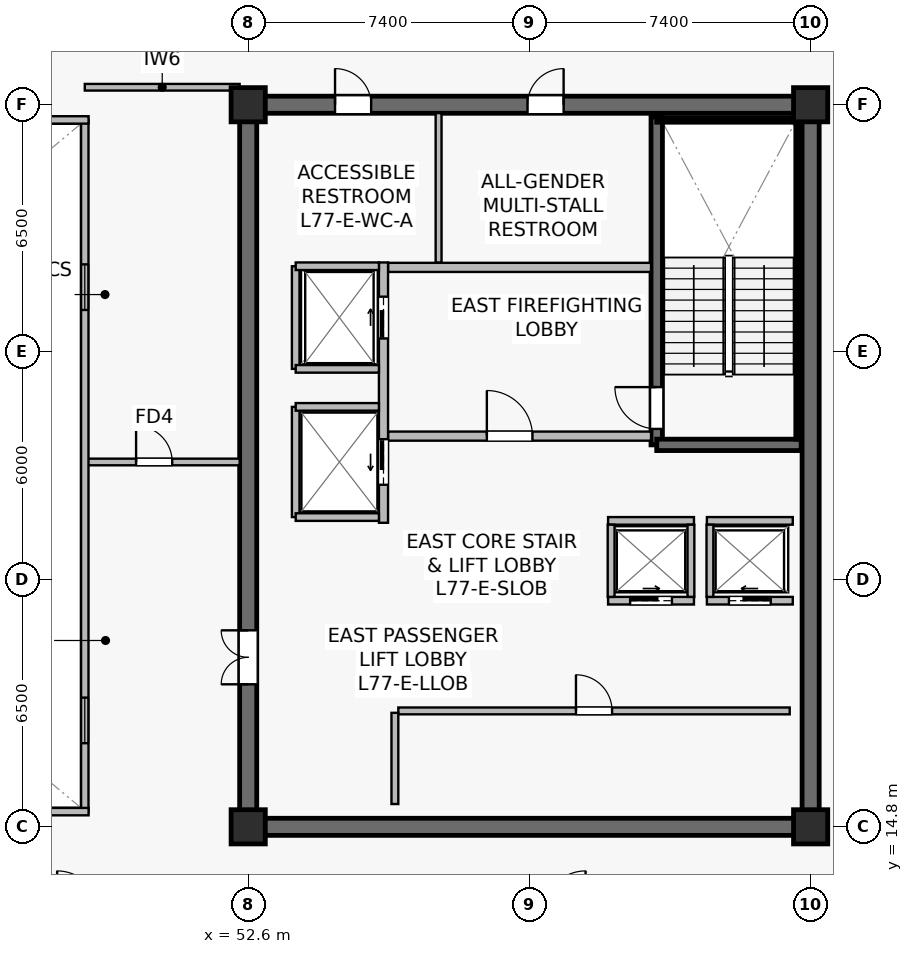
"""IFC4 building model, lengths in metres.
Left out: names, types, materials, properties, quantities, classifications, styles, units other than length and angle.
Written with IfcOpenShell. Run it as: python <this file> out.ifc"""

import sys

from ifc_helpers import new_model, si_unit, direction, frame, frame_2d, origin, origin_2d, place, context, subcontext, project, spatial, rectangle, extrude, source, transform, mapped, element, fill, save


model = new_model("IFC4")
c1 = context("Model", 3, precision=1e-05, world=origin(), true_north=direction((0.0, 1.0)))
c2 = subcontext(c1, "Body", "Model", "MODEL_VIEW")
j1 = project(units=[si_unit("LENGTHUNIT", "METRE"), si_unit("PLANEANGLEUNIT", "RADIAN")], contexts=[c1])
p1 = place(None, origin())
s1 = spatial("IfcSite", under=j1, at=p1, CompositionType="ELEMENT")
p2 = place(p1, origin())
s2 = spatial("IfcBuilding", under=s1, at=p2, CompositionType="ELEMENT")
p3 = place(p2, frame((0.0, 0.0, 322.8)))
s3 = spatial("IfcBuildingStorey", under=s2, at=p3, CompositionType="ELEMENT", Elevation=322.8)
p4 = place(p3, frame((52.375, 14.8, 0.0), z_axis=(0.0, 0.0, 1.0), x_axis=(1.0, 0.0, 0.0)))
e1 = element("IfcWall", 1, at=p4, inside=s3, PredefinedType="SHEAR", context=c2, shape_type="SweptSolid", body=[
    extrude(rectangle(XDim=15.25, YDim=0.45, at=frame_2d((7.625, 0.0))), origin(), (0.0, 0.0, 1.0), 3.92),
])
p5 = place(p3, frame((52.375, 33.8, 0.0), z_axis=(0.0, 0.0, 1.0), x_axis=(1.0, 0.0, 0.0)))
e2 = element("IfcWall", 2, at=p5, inside=s3, PredefinedType="SHEAR", context=c2, shape_type="SweptSolid", body=[
    extrude(rectangle(XDim=15.25, YDim=0.45, at=frame_2d((7.625, 0.0))), origin(), (0.0, 0.0, 1.0), 3.92),
])
p6 = place(p5, frame((7.575, 0.0, 0.0)))
e3 = element("IfcOpeningElement", 3, at=p6, cuts=e2, PredefinedType="OPENING", context=c2, shape_type="SweptSolid", body=[
    extrude(rectangle(XDim=0.95, YDim=2.15, at=frame_2d((0.475, 1.075))), frame((0.0, 0.235, 0.0), z_axis=(0.0, -1.0, 0.0), x_axis=(1.0, 0.0, 0.0)), (0.0, 0.0, 1.0), 0.47),
])
p7 = place(p5, frame((2.51, 0.0, 0.0)))
e4 = element("IfcOpeningElement", 4, at=p7, cuts=e2, PredefinedType="OPENING", context=c2, shape_type="SweptSolid", body=[
    extrude(rectangle(XDim=0.95, YDim=2.15, at=frame_2d((0.475, 1.075))), frame((0.0, 0.235, 0.0), z_axis=(0.0, -1.0, 0.0), x_axis=(1.0, 0.0, 0.0)), (0.0, 0.0, 1.0), 0.47),
])
p8 = place(p3, frame((52.6, 15.025, 0.0), z_axis=(0.0, 0.0, 1.0), x_axis=(0.0, 1.0, 0.0)))
e5 = element("IfcWall", 5, at=p8, inside=s3, PredefinedType="SHEAR", context=c2, shape_type="SweptSolid", body=[
    extrude(rectangle(XDim=18.55, YDim=0.45, at=frame_2d((9.275, 0.0))), origin(), (0.0, 0.0, 1.0), 3.92),
])
p9 = place(p8, frame((3.525, 0.0, 0.0)))
e6 = element("IfcOpeningElement", 6, at=p9, cuts=e5, PredefinedType="OPENING", context=c2, shape_type="SweptSolid", body=[
    extrude(rectangle(XDim=1.42, YDim=2.2, at=frame_2d((0.71, 1.1))), frame((0.0, 0.235, 0.0), z_axis=(0.0, -1.0, 0.0), x_axis=(1.0, 0.0, 0.0)), (0.0, 0.0, 1.0), 0.47),
])
p10 = place(p3, frame((67.4, 15.025, 0.0), z_axis=(0.0, 0.0, 1.0), x_axis=(0.0, 1.0, 0.0)))
e7 = element("IfcWall", 7, at=p10, inside=s3, PredefinedType="SHEAR", context=c2, shape_type="SweptSolid", body=[
    extrude(rectangle(XDim=18.55, YDim=0.45, at=frame_2d((9.275, 0.0))), origin(), (0.0, 0.0, 1.0), 3.92),
])
p11 = place(p3, frame((63.35, 24.85, 0.0), z_axis=(0.0, 0.0, 1.0), x_axis=(0.0, 1.0, 0.0)))
e8 = element("IfcWall", 8, at=p11, inside=s3, PredefinedType="SHEAR", context=c2, shape_type="SweptSolid", body=[
    extrude(rectangle(XDim=8.63, YDim=0.3, at=frame_2d((4.315, 0.0))), origin(), (0.0, 0.0, 1.0), 3.92),
])
p12 = place(p11, frame((0.42, 0.0, 0.0)))
e9 = element("IfcOpeningElement", 9, at=p12, cuts=e8, PredefinedType="OPENING", context=c2, shape_type="SweptSolid", body=[
    extrude(rectangle(XDim=1.1, YDim=2.15, at=frame_2d((0.55, 1.075))), frame((0.0, 0.16, 0.0), z_axis=(0.0, -1.0, 0.0), x_axis=(1.0, 0.0, 0.0)), (0.0, 0.0, 1.0), 0.32),
])
p13 = place(p3, frame((63.35, 24.85, 0.0), z_axis=(0.0, 0.0, 1.0), x_axis=(1.0, 0.0, 0.0)))
e10 = element("IfcWall", 10, at=p13, inside=s3, PredefinedType="SHEAR", context=c2, shape_type="SweptSolid", body=[
    extrude(rectangle(XDim=3.8, YDim=0.3, at=frame_2d((1.9, 0.0))), origin(), (0.0, 0.0, 1.0), 3.92),
])
p14 = place(p3, frame((63.35, 33.4, 0.0), z_axis=(0.0, 0.0, 1.0), x_axis=(1.0, 0.0, 0.0)))
e11 = element("IfcWall", 11, at=p14, inside=s3, PredefinedType="SOLIDWALL", context=c2, shape_type="SweptSolid", body=[
    extrude(rectangle(XDim=3.72, YDim=0.12, at=frame_2d((1.86, 0.0))), origin(), (0.0, 0.0, 1.0), 3.92),
])
p15 = place(p3, frame((67.07, 25.0, 0.0), z_axis=(0.0, 0.0, 1.0), x_axis=(0.0, 1.0, 0.0)))
e12 = element("IfcWall", 12, at=p15, inside=s3, PredefinedType="SOLIDWALL", context=c2, shape_type="SweptSolid", body=[
    extrude(rectangle(XDim=8.32, YDim=0.12, at=frame_2d((4.16, 0.0))), origin(), (0.0, 0.0, 1.0), 3.92),
])
m1 = source(origin(), c2, "Body", "SweptSolid", [
    extrude(rectangle(XDim=0.9, YDim=0.9, at=origin_2d()), origin(), (0.0, 0.0, 1.0), 4.2),
])
for number, where, z_axis, x_axis in (
    (13, (52.6, 14.8, 0.0), (0.0, 0.0, 1.0), (1.0, 0.0, 0.0)),
    (14, (67.4, 14.8, 0.0), (0.0, 0.0, 1.0), (1.0, 0.0, 0.0)),
    (15, (52.6, 33.8, 0.0), (0.0, 0.0, 1.0), (1.0, 0.0, 0.0)),
    (16, (67.4, 33.8, 0.0), (0.0, 0.0, 1.0), (1.0, 0.0, 0.0)),
):
    element("IfcColumn", number, at=place(p3, frame(where, z_axis=z_axis, x_axis=x_axis)), inside=s3, PredefinedType="COLUMN", context=c2, shape_type="MappedRepresentation", body=[
        mapped(m1, transform((0.0, 0.0, 0.0), scale=1.0)),
    ])
p16 = place(p3, frame((56.28, 25.08, 0.0), z_axis=(0.0, 0.0, 1.0), x_axis=(1.0, 0.0, 0.0)))
e17 = element("IfcWall", 17, at=p16, inside=s3, PredefinedType="SOLIDWALL", context=c2, shape_type="SweptSolid", body=[
    extrude(rectangle(XDim=6.92, YDim=0.24, at=frame_2d((3.46, 0.0))), origin(), (0.0, 0.0, 1.0), 3.317),
])
p17 = place(p16, frame((2.6, 0.0, 0.0)))
e18 = element("IfcOpeningElement", 18, at=p17, cuts=e17, PredefinedType="OPENING", context=c2, shape_type="SweptSolid", body=[
    extrude(rectangle(XDim=1.2, YDim=2.16, at=frame_2d((0.6, 1.08))), frame((0.0, 0.13, 0.0), z_axis=(0.0, -1.0, 0.0), x_axis=(1.0, 0.0, 0.0)), (0.0, 0.0, 1.0), 0.26),
])
p18 = place(p3, frame((56.28, 29.52, 0.0), z_axis=(0.0, 0.0, 1.0), x_axis=(1.0, 0.0, 0.0)))
e19 = element("IfcWall", 19, at=p18, inside=s3, PredefinedType="SOLIDWALL", context=c2, shape_type="SweptSolid", body=[
    extrude(rectangle(XDim=6.92, YDim=0.24, at=frame_2d((3.46, 0.0))), origin(), (0.0, 0.0, 1.0), 3.317),
])
p19 = place(p3, frame((56.16, 22.8, 0.0), z_axis=(0.0, 0.0, 1.0), x_axis=(0.0, 1.0, 0.0)))
e20 = element("IfcWall", 20, at=p19, inside=s3, PredefinedType="SOLIDWALL", context=c2, shape_type="SweptSolid", body=[
    extrude(rectangle(XDim=6.85, YDim=0.24, at=frame_2d((3.425, 0.0))), origin(), (0.0, 0.0, 1.0), 3.055),
])
p20 = place(p19, frame((4.85, 0.0, 0.0)))
e21 = element("IfcOpeningElement", 21, at=p20, cuts=e20, PredefinedType="OPENING", context=c2, shape_type="SweptSolid", body=[
    extrude(rectangle(XDim=1.1, YDim=2.22, at=frame_2d((0.55, 1.11))), frame((0.0, 0.13, 0.0), z_axis=(0.0, -1.0, 0.0), x_axis=(1.0, 0.0, 0.0)), (0.0, 0.0, 1.0), 0.26),
])
p21 = place(p19, frame((1.0, 0.0, 0.0)))
e22 = element("IfcOpeningElement", 22, at=p21, cuts=e20, PredefinedType="OPENING", context=c2, shape_type="SweptSolid", body=[
    extrude(rectangle(XDim=1.2, YDim=2.22, at=frame_2d((0.6, 1.11))), frame((0.0, 0.13, 0.0), z_axis=(0.0, -1.0, 0.0), x_axis=(1.0, 0.0, 0.0)), (0.0, 0.0, 1.0), 0.26),
])
p22 = place(p3, frame((64.67, 20.75, 0.0), z_axis=(0.0, 0.0, 1.0), x_axis=(1.0, 0.0, 0.0)))
e23 = element("IfcWall", 23, at=p22, inside=s3, PredefinedType="SOLIDWALL", context=c2, shape_type="SweptSolid", body=[
    extrude(rectangle(XDim=2.26, YDim=0.2, at=frame_2d((1.13, 0.0))), origin(), (0.0, 0.0, 1.0), 3.92),
])
p23 = place(p22, frame((0.58, 0.0, 0.0)))
e24 = element("IfcOpeningElement", 24, at=p23, cuts=e23, PredefinedType="OPENING", context=c2, shape_type="SweptSolid", body=[
    extrude(rectangle(XDim=1.1, YDim=2.22, at=frame_2d((0.55, 1.11))), frame((0.0, 0.11, 0.0), z_axis=(0.0, -1.0, 0.0), x_axis=(1.0, 0.0, 0.0)), (0.0, 0.0, 1.0), 0.22),
])
p24 = place(p3, frame((64.67, 22.85, 0.0), z_axis=(0.0, 0.0, 1.0), x_axis=(1.0, 0.0, 0.0)))
e25 = element("IfcWall", 25, at=p24, inside=s3, PredefinedType="SOLIDWALL", context=c2, shape_type="SweptSolid", body=[
    extrude(rectangle(XDim=2.26, YDim=0.2, at=frame_2d((1.13, 0.0))), origin(), (0.0, 0.0, 1.0), 3.92),
])
p25 = place(p3, frame((64.75, 20.85, 0.0), z_axis=(0.0, 0.0, 1.0), x_axis=(0.0, 1.0, 0.0)))
e26 = element("IfcWall", 26, at=p25, inside=s3, PredefinedType="SOLIDWALL", context=c2, shape_type="SweptSolid", body=[
    extrude(rectangle(XDim=1.9, YDim=0.18, at=frame_2d((0.95, 0.0))), origin(), (0.0, 0.0, 1.0), 3.92),
])
p26 = place(p3, frame((62.07, 20.75, 0.0), z_axis=(0.0, 0.0, 1.0), x_axis=(1.0, 0.0, 0.0)))
e27 = element("IfcWall", 27, at=p26, inside=s3, PredefinedType="SOLIDWALL", context=c2, shape_type="SweptSolid", body=[
    extrude(rectangle(XDim=2.26, YDim=0.2, at=frame_2d((1.13, 0.0))), origin(), (0.0, 0.0, 1.0), 3.92),
])
p27 = place(p26, frame((0.58, 0.0, 0.0)))
e28 = element("IfcOpeningElement", 28, at=p27, cuts=e27, PredefinedType="OPENING", context=c2, shape_type="SweptSolid", body=[
    extrude(rectangle(XDim=1.1, YDim=2.22, at=frame_2d((0.55, 1.11))), frame((0.0, 0.11, 0.0), z_axis=(0.0, -1.0, 0.0), x_axis=(1.0, 0.0, 0.0)), (0.0, 0.0, 1.0), 0.22),
])
p28 = place(p3, frame((62.07, 22.85, 0.0), z_axis=(0.0, 0.0, 1.0), x_axis=(1.0, 0.0, 0.0)))
e29 = element("IfcWall", 29, at=p28, inside=s3, PredefinedType="SOLIDWALL", context=c2, shape_type="SweptSolid", body=[
    extrude(rectangle(XDim=2.26, YDim=0.2, at=frame_2d((1.13, 0.0))), origin(), (0.0, 0.0, 1.0), 3.92),
])
for number, where, z_axis, x_axis in (
    (30, (62.15, 20.85, 0.0), (0.0, 0.0, 1.0), (0.0, 1.0, 0.0)),
    (31, (64.25, 20.85, 0.0), (0.0, 0.0, 1.0), (0.0, 1.0, 0.0)),
):
    element("IfcWall", number, at=place(p3, frame(where, z_axis=z_axis, x_axis=x_axis)), inside=s3, PredefinedType="SOLIDWALL", context=c2, shape_type="SweptSolid", body=[
        extrude(rectangle(XDim=1.9, YDim=0.18, at=frame_2d((0.95, 0.0))), origin(), (0.0, 0.0, 1.0), 3.92),
    ])
p29 = place(p3, frame((53.85, 26.85, 0.0), z_axis=(0.0, 0.0, 1.0), x_axis=(0.0, 1.0, 0.0)))
e32 = element("IfcWall", 32, at=p29, inside=s3, PredefinedType="SOLIDWALL", context=c2, shape_type="SweptSolid", body=[
    extrude(rectangle(XDim=2.7, YDim=0.2, at=frame_2d((1.35, 0.0))), origin(), (0.0, 0.0, 1.0), 3.92),
])
p30 = place(p3, frame((53.85, 29.55, 0.0), z_axis=(0.0, 0.0, 1.0), x_axis=(1.0, 0.0, 0.0)))
e33 = element("IfcWall", 33, at=p30, inside=s3, PredefinedType="SOLIDWALL", context=c2, shape_type="SweptSolid", body=[
    extrude(rectangle(XDim=2.19, YDim=0.2, at=frame_2d((1.095, 0.0))), origin(), (0.0, 0.0, 1.0), 3.92),
])
p31 = place(p3, frame((53.85, 26.85, 0.0), z_axis=(0.0, 0.0, 1.0), x_axis=(1.0, 0.0, 0.0)))
e34 = element("IfcWall", 34, at=p31, inside=s3, PredefinedType="SOLIDWALL", context=c2, shape_type="SweptSolid", body=[
    extrude(rectangle(XDim=2.19, YDim=0.2, at=frame_2d((1.095, 0.0))), origin(), (0.0, 0.0, 1.0), 3.317),
])
p32 = place(p3, frame((53.85, 22.95, 0.0), z_axis=(0.0, 0.0, 1.0), x_axis=(0.0, 1.0, 0.0)))
e35 = element("IfcWall", 35, at=p32, inside=s3, PredefinedType="SOLIDWALL", context=c2, shape_type="SweptSolid", body=[
    extrude(rectangle(XDim=2.9, YDim=0.2, at=frame_2d((1.45, 0.0))), origin(), (0.0, 0.0, 1.0), 3.055),
])
for number, where, z_axis, x_axis in (
    (36, (53.85, 25.85, 0.0), (0.0, 0.0, 1.0), (1.0, 0.0, 0.0)),
    (37, (53.85, 22.95, 0.0), (0.0, 0.0, 1.0), (1.0, 0.0, 0.0)),
):
    element("IfcWall", number, at=place(p3, frame(where, z_axis=z_axis, x_axis=x_axis)), inside=s3, PredefinedType="SOLIDWALL", context=c2, shape_type="SweptSolid", body=[
        extrude(rectangle(XDim=2.19, YDim=0.2, at=frame_2d((1.095, 0.0))), origin(), (0.0, 0.0, 1.0), 3.92),
    ])
p33 = place(p3, frame((56.55, 17.85, 0.0), z_axis=(0.0, 0.0, 1.0), x_axis=(1.0, 0.0, 0.0)))
e38 = element("IfcWall", 38, at=p33, inside=s3, PredefinedType="SOLIDWALL", context=c2, shape_type="SweptSolid", body=[
    extrude(rectangle(XDim=10.3, YDim=0.18, at=frame_2d((5.15, 0.0))), origin(), (0.0, 0.0, 1.0), 3.317),
])
p34 = place(p33, frame((4.675, 0.0, 0.0)))
e39 = element("IfcOpeningElement", 39, at=p34, cuts=e38, PredefinedType="OPENING", context=c2, shape_type="SweptSolid", body=[
    extrude(rectangle(XDim=0.95, YDim=2.15, at=frame_2d((0.475, 1.075))), frame((0.0, 0.1, 0.0), z_axis=(0.0, -1.0, 0.0), x_axis=(1.0, 0.0, 0.0)), (0.0, 0.0, 1.0), 0.2),
])
p35 = place(p3, frame((56.46, 15.4, 0.0), z_axis=(0.0, 0.0, 1.0), x_axis=(0.0, 1.0, 0.0)))
e40 = element("IfcWall", 40, at=p35, inside=s3, PredefinedType="SOLIDWALL", context=c2, shape_type="SweptSolid", body=[
    extrude(rectangle(XDim=2.4, YDim=0.18, at=frame_2d((1.2, 0.0))), origin(), (0.0, 0.0, 1.0), 3.92),
])
p36 = place(p3, frame((57.61, 29.65, 0.0), z_axis=(0.0, 0.0, 1.0), x_axis=(0.0, 1.0, 0.0)))
e41 = element("IfcWall", 41, at=p36, inside=s3, PredefinedType="PLUMBINGWALL", context=c2, shape_type="SweptSolid", body=[
    extrude(rectangle(XDim=3.93, YDim=0.155, at=frame_2d((1.965, 0.0))), origin(), (0.0, 0.0, 1.0), 3.92),
])
p37 = place(p3, frame((48.3, 34.26, 0.0), z_axis=(0.0, 0.0, 1.0), x_axis=(1.0, 0.0, 0.0)))
e42 = element("IfcWall", 42, at=p37, inside=s3, PredefinedType="PARTITIONING", context=c2, shape_type="SweptSolid", body=[
    extrude(rectangle(XDim=4.075, YDim=0.175, at=frame_2d((2.038, 0.0))), origin(), (0.0, 0.0, 1.0), 3.655),
])
p38 = place(p3, frame((48.3, 24.4, 0.0), z_axis=(0.0, 0.0, 1.0), x_axis=(1.0, 0.0, 0.0)))
e43 = element("IfcWall", 43, at=p38, inside=s3, PredefinedType="PARTITIONING", context=c2, shape_type="SweptSolid", body=[
    extrude(rectangle(XDim=4.075, YDim=0.175, at=frame_2d((2.038, 0.0))), origin(), (0.0, 0.0, 1.0), 3.92),
])
p39 = place(p38, frame((1.35, 0.0, 0.0)))
e44 = element("IfcOpeningElement", 44, at=p39, cuts=e43, PredefinedType="OPENING", context=c2, shape_type="SweptSolid", body=[
    extrude(rectangle(XDim=0.95, YDim=2.15, at=frame_2d((0.475, 1.075))), frame((0.0, 0.098, 0.0), z_axis=(0.0, -1.0, 0.0), x_axis=(1.0, 0.0, 0.0)), (0.0, 0.0, 1.0), 0.195),
])
p40 = place(p3, frame((48.3, 15.2, 0.0), z_axis=(0.0, 0.0, 1.0), x_axis=(0.0, 1.0, 0.0)))
e45 = element("IfcWall", 45, at=p40, inside=s3, PredefinedType="SOLIDWALL", context=c2, shape_type="SweptSolid", body=[
    extrude(rectangle(XDim=18.2, YDim=0.195, at=frame_2d((9.1, 0.0))), origin(), (0.0, 0.0, 1.0), 3.92),
])
p41 = place(p40, frame((1.8, 0.0, 0.9)))
e46 = element("IfcOpeningElement", 46, at=p41, cuts=e45, PredefinedType="OPENING", context=c2, shape_type="SweptSolid", body=[
    extrude(rectangle(XDim=1.2, YDim=1.35, at=frame_2d((0.6, 0.675))), frame((0.0, 0.107, 0.0), z_axis=(0.0, -1.0, 0.0), x_axis=(1.0, 0.0, 0.0)), (0.0, 0.0, 1.0), 0.215),
])
p42 = place(p40, frame((13.2, 0.0, 0.9)))
e47 = element("IfcOpeningElement", 47, at=p42, cuts=e45, PredefinedType="OPENING", context=c2, shape_type="SweptSolid", body=[
    extrude(rectangle(XDim=1.2, YDim=1.35, at=frame_2d((0.6, 0.675))), frame((0.0, 0.107, 0.0), z_axis=(0.0, -1.0, 0.0), x_axis=(1.0, 0.0, 0.0)), (0.0, 0.0, 1.0), 0.215),
])
for number, where, z_axis, x_axis in (
    (48, (26.4, 15.2, 0.0), (0.0, 0.0, 1.0), (1.0, 0.0, 0.0)),
    (49, (26.4, 33.4, 0.0), (0.0, 0.0, 1.0), (1.0, 0.0, 0.0)),
):
    element("IfcWall", number, at=place(p3, frame(where, z_axis=z_axis, x_axis=x_axis)), inside=s3, PredefinedType="SOLIDWALL", context=c2, shape_type="SweptSolid", body=[
        extrude(rectangle(XDim=22.0, YDim=0.195, at=frame_2d((11.0, 0.0))), origin(), (0.0, 0.0, 1.0), 3.92),
    ])
m2 = source(origin(), c2, "Body", "SweptSolid", [
    extrude(rectangle(XDim=1.2, YDim=1.35, at=frame_2d((0.6, 0.675))), frame((0.0, 0.03, 0.0), z_axis=(0.0, -1.0, 0.0), x_axis=(1.0, 0.0, 0.0)), (0.0, 0.0, 1.0), 0.06),
])
p43 = place(p41, origin())
e50 = element("IfcWindow", 50, at=p43, inside=s3, PartitioningType="SINGLE_PANEL", PredefinedType="WINDOW", context=c2, shape_type="MappedRepresentation", body=[
    mapped(m2, transform((0.0, 0.0, 0.0), scale=1.0)),
])
fill(e46, e50)
p44 = place(p42, origin())
e51 = element("IfcWindow", 51, at=p44, inside=s3, PartitioningType="SINGLE_PANEL", PredefinedType="WINDOW", context=c2, shape_type="MappedRepresentation", body=[
    mapped(m2, transform((0.0, 0.0, 0.0), scale=1.0)),
])
fill(e47, e51)
m3 = source(origin(), c2, "Body", "SweptSolid", [
    extrude(rectangle(XDim=1.1, YDim=2.15, at=frame_2d((0.55, 1.075))), frame((0.0, 0.025, 0.0), z_axis=(0.0, -1.0, 0.0), x_axis=(1.0, 0.0, 0.0)), (0.0, 0.0, 1.0), 0.05),
])
p45 = place(p12, origin())
e52 = element("IfcDoor", 52, at=p45, inside=s3, OperationType="SINGLE_SWING_RIGHT", PredefinedType="DOOR", context=c2, shape_type="MappedRepresentation", body=[
    mapped(m3, transform((0.0, 0.0, 0.0), scale=1.0)),
])
fill(e9, e52)
m4 = source(origin(), c2, "Body", "SweptSolid", [
    extrude(rectangle(XDim=1.2, YDim=2.16, at=frame_2d((0.6, 1.08))), frame((0.0, 0.025, 0.0), z_axis=(0.0, -1.0, 0.0), x_axis=(1.0, 0.0, 0.0)), (0.0, 0.0, 1.0), 0.05),
])
p46 = place(p17, origin())
e53 = element("IfcDoor", 53, at=p46, inside=s3, OperationType="SINGLE_SWING_LEFT", PredefinedType="DOOR", context=c2, shape_type="MappedRepresentation", body=[
    mapped(m4, transform((0.0, 0.0, 0.0), scale=1.0)),
])
fill(e18, e53)
m5 = source(origin(), c2, "Body", "SweptSolid", [
    extrude(rectangle(XDim=1.1, YDim=2.22, at=frame_2d((0.55, 1.11))), frame((0.0, 0.025, 0.0), z_axis=(0.0, -1.0, 0.0), x_axis=(1.0, 0.0, 0.0)), (0.0, 0.0, 1.0), 0.05),
])
p47 = place(p23, origin())
e54 = element("IfcDoor", 54, at=p47, inside=s3, OperationType="SLIDING_TO_LEFT", PredefinedType="USERDEFINED", context=c2, shape_type="MappedRepresentation", body=[
    mapped(m5, transform((0.0, 0.0, 0.0), scale=1.0)),
])
fill(e24, e54)
p48 = place(p27, origin())
e55 = element("IfcDoor", 55, at=p48, inside=s3, OperationType="SLIDING_TO_RIGHT", PredefinedType="USERDEFINED", context=c2, shape_type="MappedRepresentation", body=[
    mapped(m5, transform((0.0, 0.0, 0.0), scale=1.0)),
])
fill(e28, e55)
p49 = place(p20, origin())
e56 = element("IfcDoor", 56, at=p49, inside=s3, OperationType="SLIDING_TO_RIGHT", PredefinedType="USERDEFINED", context=c2, shape_type="MappedRepresentation", body=[
    mapped(m5, transform((0.0, 0.0, 0.0), scale=1.0)),
])
fill(e21, e56)
m6 = source(origin(), c2, "Body", "SweptSolid", [
    extrude(rectangle(XDim=1.2, YDim=2.22, at=frame_2d((0.6, 1.11))), frame((0.0, 0.025, 0.0), z_axis=(0.0, -1.0, 0.0), x_axis=(1.0, 0.0, 0.0)), (0.0, 0.0, 1.0), 0.05),
])
p50 = place(p21, origin())
e57 = element("IfcDoor", 57, at=p50, inside=s3, OperationType="SLIDING_TO_LEFT", PredefinedType="USERDEFINED", context=c2, shape_type="MappedRepresentation", body=[
    mapped(m6, transform((0.0, 0.0, 0.0), scale=1.0)),
])
fill(e22, e57)
m7 = source(origin(), c2, "Body", "SweptSolid", [
    extrude(rectangle(XDim=0.95, YDim=2.15, at=frame_2d((0.475, 1.075))), frame((0.0, 0.025, 0.0), z_axis=(0.0, -1.0, 0.0), x_axis=(1.0, 0.0, 0.0)), (0.0, 0.0, 1.0), 0.05),
])
p51 = place(p34, origin())
e58 = element("IfcDoor", 58, at=p51, inside=s3, OperationType="SINGLE_SWING_LEFT", PredefinedType="DOOR", context=c2, shape_type="MappedRepresentation", body=[
    mapped(m7, transform((0.0, 0.0, 0.0), scale=1.0)),
])
fill(e39, e58)
m8 = source(origin(), c2, "Body", "SweptSolid", [
    extrude(rectangle(XDim=1.42, YDim=2.2, at=frame_2d((0.71, 1.1))), frame((0.0, 0.025, 0.0), z_axis=(0.0, -1.0, 0.0), x_axis=(1.0, 0.0, 0.0)), (0.0, 0.0, 1.0), 0.05),
])
p52 = place(p9, origin())
e59 = element("IfcDoor", 59, at=p52, inside=s3, OperationType="DOUBLE_DOOR_SINGLE_SWING", PredefinedType="DOOR", context=c2, shape_type="MappedRepresentation", body=[
    mapped(m8, transform((0.0, 0.0, 0.0), scale=1.0)),
])
fill(e6, e59)
p53 = place(p6, origin())
e60 = element("IfcDoor", 60, at=p53, inside=s3, OperationType="SINGLE_SWING_RIGHT", PredefinedType="DOOR", context=c2, shape_type="MappedRepresentation", body=[
    mapped(m7, transform((0.0, 0.0, 0.0), scale=1.0)),
])
fill(e3, e60)
p54 = place(p7, origin())
e61 = element("IfcDoor", 61, at=p54, inside=s3, OperationType="SINGLE_SWING_LEFT", PredefinedType="DOOR", context=c2, shape_type="MappedRepresentation", body=[
    mapped(m7, transform((0.0, 0.0, 0.0), scale=1.0)),
])
fill(e4, e61)
p55 = place(p39, origin())
e62 = element("IfcDoor", 62, at=p55, inside=s3, OperationType="SINGLE_SWING_LEFT", PredefinedType="DOOR", context=c2, shape_type="MappedRepresentation", body=[
    mapped(m7, transform((0.0, 0.0, 0.0), scale=1.0)),
])
fill(e44, e62)
save(model, sys.argv[1])
